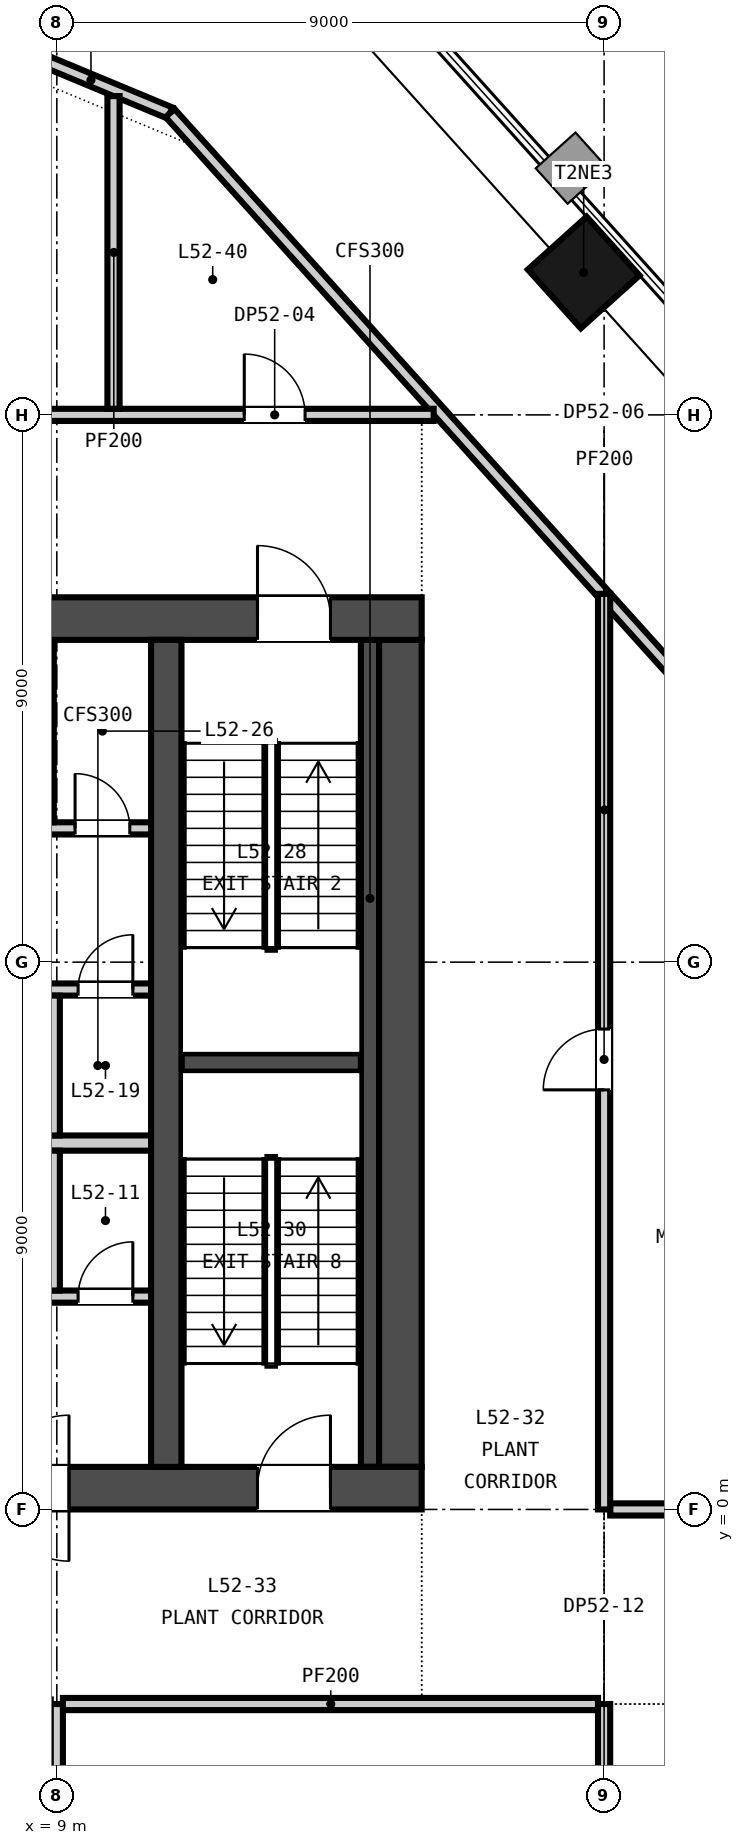
"""IFC4 building model, lengths in metres.
Left out: names, types, materials, properties, quantities, classifications, styles, units other than length and angle.
Written with IfcOpenShell. Run it as: python <this file> out.ifc"""

import sys

from ifc_helpers import new_model, si_unit, direction, frame, frame_2d, origin, origin_2d, place, context, subcontext, project, spatial, rectangle, extrude, element, fill, save


model = new_model("IFC4")
c1 = context("Model", 3, precision=1e-05, world=origin(), true_north=direction((0.0, 1.0)))
c2 = subcontext(c1, "Body", "Model", "MODEL_VIEW")
j1 = project(units=[si_unit("LENGTHUNIT", "METRE"), si_unit("PLANEANGLEUNIT", "RADIAN")], contexts=[c1])
p1 = place(None, origin())
s1 = spatial("IfcSite", under=j1, at=p1, CompositionType="ELEMENT")
p2 = place(p1, origin())
s2 = spatial("IfcBuilding", under=s1, at=p2, CompositionType="ELEMENT")
p3 = place(p2, frame((0.0, 0.0, 207.3)))
s3 = spatial("IfcBuildingStorey", under=s2, at=p3, CompositionType="ELEMENT", Elevation=207.3)
p4 = place(p3, frame((-15.0, 0.35, -0.3), z_axis=(0.0, 0.0, 1.0), x_axis=(1.0, 0.0, 0.0)))
e1 = element("IfcWall", 1, at=p4, inside=s3, PredefinedType="SOLIDWALL", context=c2, shape_type="SweptSolid", body=[
    extrude(rectangle(XDim=30.0, YDim=0.7, at=frame_2d((15.0, 0.0))), origin(), (0.0, 0.0, 1.0), 4.5),
])
p5 = place(p4, frame((5.8, 0.0, 0.3)))
e2 = element("IfcOpeningElement", 2, at=p5, cuts=e1, PredefinedType="OPENING", context=c2, shape_type="SweptSolid", body=[
    extrude(rectangle(XDim=2.4, YDim=2.4, at=frame_2d((1.2, 1.2))), frame((0.0, 0.36, 0.0), z_axis=(0.0, -1.0, 0.0), x_axis=(1.0, 0.0, 0.0)), (0.0, 0.0, 1.0), 0.72),
])
p6 = place(p4, frame((13.8, 0.0, 0.3)))
e3 = element("IfcOpeningElement", 3, at=p6, cuts=e1, PredefinedType="OPENING", context=c2, shape_type="SweptSolid", body=[
    extrude(rectangle(XDim=2.4, YDim=2.4, at=frame_2d((1.2, 1.2))), frame((0.0, 0.36, 0.0), z_axis=(0.0, -1.0, 0.0), x_axis=(1.0, 0.0, 0.0)), (0.0, 0.0, 1.0), 0.72),
])
p7 = place(p4, frame((21.8, 0.0, 0.3)))
e4 = element("IfcOpeningElement", 4, at=p7, cuts=e1, PredefinedType="OPENING", context=c2, shape_type="SweptSolid", body=[
    extrude(rectangle(XDim=2.4, YDim=2.4, at=frame_2d((1.2, 1.2))), frame((0.0, 0.36, 0.0), z_axis=(0.0, -1.0, 0.0), x_axis=(1.0, 0.0, 0.0)), (0.0, 0.0, 1.0), 0.72),
])
p8 = place(p4, frame((1.5, 0.0, 0.3)))
e5 = element("IfcOpeningElement", 5, at=p8, cuts=e1, PredefinedType="OPENING", context=c2, shape_type="SweptSolid", body=[
    extrude(rectangle(XDim=1.2, YDim=2.1, at=frame_2d((0.6, 1.05))), frame((0.0, 0.36, 0.0), z_axis=(0.0, -1.0, 0.0), x_axis=(1.0, 0.0, 0.0)), (0.0, 0.0, 1.0), 0.72),
])
p9 = place(p4, frame((27.3, 0.0, 0.3)))
e6 = element("IfcOpeningElement", 6, at=p9, cuts=e1, PredefinedType="OPENING", context=c2, shape_type="SweptSolid", body=[
    extrude(rectangle(XDim=1.2, YDim=2.1, at=frame_2d((0.6, 1.05))), frame((0.0, 0.36, 0.0), z_axis=(0.0, -1.0, 0.0), x_axis=(1.0, 0.0, 0.0)), (0.0, 0.0, 1.0), 0.72),
])
p10 = place(p3, frame((-15.0, 14.65, -0.3), z_axis=(0.0, 0.0, 1.0), x_axis=(1.0, 0.0, 0.0)))
e7 = element("IfcWall", 7, at=p10, inside=s3, PredefinedType="SOLIDWALL", context=c2, shape_type="SweptSolid", body=[
    extrude(rectangle(XDim=30.0, YDim=0.7, at=frame_2d((15.0, 0.0))), origin(), (0.0, 0.0, 1.0), 4.5),
])
p11 = place(p10, frame((9.25, 0.0, 0.3)))
e8 = element("IfcOpeningElement", 8, at=p11, cuts=e7, PredefinedType="OPENING", context=c2, shape_type="SweptSolid", body=[
    extrude(rectangle(XDim=1.5, YDim=2.1, at=frame_2d((0.75, 1.05))), frame((0.0, 0.36, 0.0), z_axis=(0.0, -1.0, 0.0), x_axis=(1.0, 0.0, 0.0)), (0.0, 0.0, 1.0), 0.72),
])
p12 = place(p10, frame((19.4, 0.0, 0.3)))
e9 = element("IfcOpeningElement", 9, at=p12, cuts=e7, PredefinedType="OPENING", context=c2, shape_type="SweptSolid", body=[
    extrude(rectangle(XDim=1.5, YDim=2.1, at=frame_2d((0.75, 1.05))), frame((0.0, 0.36, 0.0), z_axis=(0.0, -1.0, 0.0), x_axis=(1.0, 0.0, 0.0)), (0.0, 0.0, 1.0), 0.72),
])
p13 = place(p10, frame((1.5, 0.0, 0.3)))
e10 = element("IfcOpeningElement", 10, at=p13, cuts=e7, PredefinedType="OPENING", context=c2, shape_type="SweptSolid", body=[
    extrude(rectangle(XDim=1.2, YDim=2.1, at=frame_2d((0.6, 1.05))), frame((0.0, 0.36, 0.0), z_axis=(0.0, -1.0, 0.0), x_axis=(1.0, 0.0, 0.0)), (0.0, 0.0, 1.0), 0.72),
])
p14 = place(p10, frame((27.3, 0.0, 0.3)))
e11 = element("IfcOpeningElement", 11, at=p14, cuts=e7, PredefinedType="OPENING", context=c2, shape_type="SweptSolid", body=[
    extrude(rectangle(XDim=1.2, YDim=2.1, at=frame_2d((0.6, 1.05))), frame((0.0, 0.36, 0.0), z_axis=(0.0, -1.0, 0.0), x_axis=(1.0, 0.0, 0.0)), (0.0, 0.0, 1.0), 0.72),
])
p15 = place(p3, frame((14.65, 0.7, -0.3), z_axis=(0.0, 0.0, 1.0), x_axis=(0.0, 1.0, 0.0)))
e12 = element("IfcWall", 12, at=p15, inside=s3, PredefinedType="SOLIDWALL", context=c2, shape_type="SweptSolid", body=[
    extrude(rectangle(XDim=13.6, YDim=0.7, at=frame_2d((6.8, 0.0))), origin(), (0.0, 0.0, 1.0), 4.5),
])
p16 = place(p3, frame((10.8, 0.7, -0.3), z_axis=(0.0, 0.0, 1.0), x_axis=(0.0, 1.0, 0.0)))
e13 = element("IfcWall", 13, at=p16, inside=s3, PredefinedType="SOLIDWALL", context=c2, shape_type="SweptSolid", body=[
    extrude(rectangle(XDim=13.6, YDim=0.5, at=frame_2d((6.8, 0.0))), origin(), (0.0, 0.0, 1.0), 4.5),
])
p17 = place(p3, frame((17.664, 20.342, -0.3), z_axis=(0.0, 0.0, 1.0), x_axis=(-0.669130606359, 0.743144825477, 0.0)))
e14 = element("IfcColumn", 14, at=p17, inside=s3, PredefinedType="COLUMN", context=c2, shape_type="SweptSolid", body=[
    extrude(rectangle(XDim=1.3, YDim=1.3, at=origin_2d()), origin(), (0.0, 0.0, 1.0), 4.5),
])
p18 = place(p3, frame((-10.55, 3.5, 0.0), z_axis=(0.0, 0.0, 1.0), x_axis=(1.0, 0.0, 0.0)))
e15 = element("IfcWall", 15, at=p18, inside=s3, PredefinedType="PARTITIONING", context=c2, shape_type="SweptSolid", body=[
    extrude(rectangle(XDim=21.1, YDim=0.2, at=frame_2d((10.55, 0.0))), origin(), (0.0, 0.0, 1.0), 4.2),
])
p19 = place(p18, frame((19.9, 0.0, 0.0)))
e16 = element("IfcOpeningElement", 16, at=p19, cuts=e15, PredefinedType="OPENING", context=c2, shape_type="SweptSolid", body=[
    extrude(rectangle(XDim=0.9, YDim=2.1, at=frame_2d((0.45, 1.05))), frame((0.0, 0.11, 0.0), z_axis=(0.0, -1.0, 0.0), x_axis=(1.0, 0.0, 0.0)), (0.0, 0.0, 1.0), 0.22),
])
p20 = place(p3, frame((-10.55, 6.025, 0.0), z_axis=(0.0, 0.0, 1.0), x_axis=(1.0, 0.0, 0.0)))
e17 = element("IfcWall", 17, at=p20, inside=s3, PredefinedType="PARTITIONING", context=c2, shape_type="SweptSolid", body=[
    extrude(rectangle(XDim=21.1, YDim=0.25, at=frame_2d((10.55, 0.0))), origin(), (0.0, 0.0, 1.0), 4.2),
])
p21 = place(p3, frame((-10.55, 8.55, 0.0), z_axis=(0.0, 0.0, 1.0), x_axis=(1.0, 0.0, 0.0)))
e18 = element("IfcWall", 18, at=p21, inside=s3, PredefinedType="PARTITIONING", context=c2, shape_type="SweptSolid", body=[
    extrude(rectangle(XDim=21.1, YDim=0.2, at=frame_2d((10.55, 0.0))), origin(), (0.0, 0.0, 1.0), 4.2),
])
p22 = place(p21, frame((19.9, 0.0, 0.0)))
e19 = element("IfcOpeningElement", 19, at=p22, cuts=e18, PredefinedType="OPENING", context=c2, shape_type="SweptSolid", body=[
    extrude(rectangle(XDim=0.9, YDim=2.1, at=frame_2d((0.45, 1.05))), frame((0.0, 0.11, 0.0), z_axis=(0.0, -1.0, 0.0), x_axis=(1.0, 0.0, 0.0)), (0.0, 0.0, 1.0), 0.22),
])
p23 = place(p3, frame((5.9, 11.2, 0.0), z_axis=(0.0, 0.0, 1.0), x_axis=(1.0, 0.0, 0.0)))
e20 = element("IfcWall", 20, at=p23, inside=s3, PredefinedType="PARTITIONING", context=c2, shape_type="SweptSolid", body=[
    extrude(rectangle(XDim=4.65, YDim=0.2, at=frame_2d((2.325, 0.0))), origin(), (0.0, 0.0, 1.0), 4.2),
])
p24 = place(p23, frame((3.4, 0.0, 0.0)))
e21 = element("IfcOpeningElement", 21, at=p24, cuts=e20, PredefinedType="OPENING", context=c2, shape_type="SweptSolid", body=[
    extrude(rectangle(XDim=0.9, YDim=2.1, at=frame_2d((0.45, 1.05))), frame((0.0, 0.11, 0.0), z_axis=(0.0, -1.0, 0.0), x_axis=(1.0, 0.0, 0.0)), (0.0, 0.0, 1.0), 0.22),
])
p25 = place(p3, frame((8.925, 3.6, 0.0), z_axis=(0.0, 0.0, 1.0), x_axis=(0.0, 1.0, 0.0)))
e22 = element("IfcWall", 22, at=p25, inside=s3, PredefinedType="PARTITIONING", context=c2, shape_type="SweptSolid", body=[
    extrude(rectangle(XDim=2.3, YDim=0.25, at=frame_2d((1.15, 0.0))), origin(), (0.0, 0.0, 1.0), 4.2),
])
p26 = place(p3, frame((8.925, 6.15, 0.0), z_axis=(0.0, 0.0, 1.0), x_axis=(0.0, 1.0, 0.0)))
e23 = element("IfcWall", 23, at=p26, inside=s3, PredefinedType="PARTITIONING", context=c2, shape_type="SweptSolid", body=[
    extrude(rectangle(XDim=2.3, YDim=0.25, at=frame_2d((1.15, 0.0))), origin(), (0.0, 0.0, 1.0), 4.2),
])
p27 = place(p3, frame((8.825, 11.3, 0.0), z_axis=(0.0, 0.0, 1.0), x_axis=(0.0, 1.0, 0.0)))
e24 = element("IfcWall", 24, at=p27, inside=s3, PredefinedType="PARTITIONING", context=c2, shape_type="SweptSolid", body=[
    extrude(rectangle(XDim=3.0, YDim=0.25, at=frame_2d((1.5, 0.0))), origin(), (0.0, 0.0, 1.0), 4.2),
])
p28 = place(p3, frame((11.05, 7.35, 0.0), z_axis=(0.0, 0.0, 1.0), x_axis=(1.0, 0.0, 0.0)))
e25 = element("IfcWall", 25, at=p28, inside=s3, PredefinedType="SOLIDWALL", context=c2, shape_type="SweptSolid", body=[
    extrude(rectangle(XDim=2.95, YDim=0.3, at=frame_2d((1.475, 0.0))), origin(), (0.0, 0.0, 1.0), 4.2),
])
p29 = place(p3, frame((14.15, 0.7, 0.0), z_axis=(0.0, 0.0, 1.0), x_axis=(0.0, 1.0, 0.0)))
e26 = element("IfcWall", 26, at=p29, inside=s3, PredefinedType="SOLIDWALL", context=c2, shape_type="SweptSolid", body=[
    extrude(rectangle(XDim=13.6, YDim=0.3, at=frame_2d((6.8, 0.0))), origin(), (0.0, 0.0, 1.0), 4.2),
])
p30 = place(p3, frame((9.1, -3.2, 0.0), z_axis=(0.0, 0.0, 1.0), x_axis=(1.0, 0.0, 0.0)))
e27 = element("IfcWall", 27, at=p30, inside=s3, PredefinedType="PARTITIONING", context=c2, shape_type="SweptSolid", body=[
    extrude(rectangle(XDim=8.8, YDim=0.2, at=frame_2d((4.4, 0.0))), origin(), (0.0, 0.0, 1.0), 4.2),
])
p31 = place(p3, frame((18.1, 0.0, 0.0), z_axis=(0.0, 0.0, 1.0), x_axis=(1.0, 0.0, 0.0)))
e28 = element("IfcWall", 28, at=p31, inside=s3, PredefinedType="PARTITIONING", context=c2, shape_type="SweptSolid", body=[
    extrude(rectangle(XDim=9.725, YDim=0.2, at=frame_2d((4.863, 0.0))), origin(), (0.0, 0.0, 1.0), 4.2),
])
p32 = place(p3, frame((-17.925, 18.0, 0.0), z_axis=(0.0, 0.0, 1.0), x_axis=(1.0, 0.0, 0.0)))
e29 = element("IfcWall", 29, at=p32, inside=s3, PredefinedType="PARTITIONING", context=c2, shape_type="SweptSolid", body=[
    extrude(rectangle(XDim=33.122, YDim=0.2, at=frame_2d((16.561, 0.0))), origin(), (0.0, 0.0, 1.0), 4.2),
])
p33 = place(p32, frame((0.9, 0.0, 0.0)))
e30 = element("IfcOpeningElement", 30, at=p33, cuts=e29, PredefinedType="OPENING", context=c2, shape_type="SweptSolid", body=[
    extrude(rectangle(XDim=1.0, YDim=2.1, at=frame_2d((0.5, 1.05))), frame((0.0, 0.11, 0.0), z_axis=(0.0, -1.0, 0.0), x_axis=(1.0, 0.0, 0.0)), (0.0, 0.0, 1.0), 0.22),
])
p34 = place(p32, frame((11.109, 0.0, 0.0)))
e31 = element("IfcOpeningElement", 31, at=p34, cuts=e29, PredefinedType="OPENING", context=c2, shape_type="SweptSolid", body=[
    extrude(rectangle(XDim=1.0, YDim=2.1, at=frame_2d((0.5, 1.05))), frame((0.0, 0.11, 0.0), z_axis=(0.0, -1.0, 0.0), x_axis=(1.0, 0.0, 0.0)), (0.0, 0.0, 1.0), 0.22),
])
p35 = place(p32, frame((22.859, 0.0, 0.0)))
e32 = element("IfcOpeningElement", 32, at=p35, cuts=e29, PredefinedType="OPENING", context=c2, shape_type="SweptSolid", body=[
    extrude(rectangle(XDim=1.0, YDim=2.1, at=frame_2d((0.5, 1.05))), frame((0.0, 0.11, 0.0), z_axis=(0.0, -1.0, 0.0), x_axis=(1.0, 0.0, 0.0)), (0.0, 0.0, 1.0), 0.22),
])
p36 = place(p32, frame((30.008, 0.0, 0.0)))
e33 = element("IfcOpeningElement", 33, at=p36, cuts=e29, PredefinedType="OPENING", context=c2, shape_type="SweptSolid", body=[
    extrude(rectangle(XDim=1.0, YDim=2.1, at=frame_2d((0.5, 1.05))), frame((0.0, 0.11, 0.0), z_axis=(0.0, -1.0, 0.0), x_axis=(1.0, 0.0, 0.0)), (0.0, 0.0, 1.0), 0.22),
])
p37 = place(p3, frame((9.0, -9.0, 0.0), z_axis=(0.0, 0.0, 1.0), x_axis=(0.0, 1.0, 0.0)))
e34 = element("IfcWall", 34, at=p37, inside=s3, PredefinedType="PARTITIONING", context=c2, shape_type="SweptSolid", body=[
    extrude(rectangle(XDim=5.8, YDim=0.2, at=frame_2d((2.9, 0.0))), origin(), (0.0, 0.0, 1.0), 4.2),
])
p38 = place(p3, frame((9.932, 18.1, 0.0), z_axis=(0.0, 0.0, 1.0), x_axis=(0.0, 1.0, 0.0)))
e35 = element("IfcWall", 35, at=p38, inside=s3, PredefinedType="PARTITIONING", context=c2, shape_type="SweptSolid", body=[
    extrude(rectangle(XDim=5.142, YDim=0.2, at=frame_2d((2.571, 0.0))), origin(), (0.0, 0.0, 1.0), 4.2),
])
p39 = place(p3, frame((18.0, -15.5, 0.0), z_axis=(0.0, 0.0, 1.0), x_axis=(0.0, 1.0, 0.0)))
e36 = element("IfcWall", 36, at=p39, inside=s3, PredefinedType="PARTITIONING", context=c2, shape_type="SweptSolid", body=[
    extrude(rectangle(XDim=12.3, YDim=0.2, at=frame_2d((6.15, 0.0))), origin(), (0.0, 0.0, 1.0), 4.2),
])
p40 = place(p39, frame((5.65, 0.0, 0.0)))
e37 = element("IfcOpeningElement", 37, at=p40, cuts=e36, PredefinedType="OPENING", context=c2, shape_type="SweptSolid", body=[
    extrude(rectangle(XDim=1.0, YDim=2.1, at=frame_2d((0.5, 1.05))), frame((0.0, 0.11, 0.0), z_axis=(0.0, -1.0, 0.0), x_axis=(1.0, 0.0, 0.0)), (0.0, 0.0, 1.0), 0.22),
])
p41 = place(p3, frame((18.0, 0.0, 0.0), z_axis=(0.0, 0.0, 1.0), x_axis=(0.0, 1.0, 0.0)))
e38 = element("IfcWall", 38, at=p41, inside=s3, PredefinedType="PARTITIONING", context=c2, shape_type="SweptSolid", body=[
    extrude(rectangle(XDim=15.057, YDim=0.2, at=frame_2d((7.529, 0.0))), origin(), (0.0, 0.0, 1.0), 4.2),
])
p42 = place(p41, frame((6.9, 0.0, 0.0)))
e39 = element("IfcOpeningElement", 39, at=p42, cuts=e38, PredefinedType="OPENING", context=c2, shape_type="SweptSolid", body=[
    extrude(rectangle(XDim=1.0, YDim=2.1, at=frame_2d((0.5, 1.05))), frame((0.0, 0.11, 0.0), z_axis=(0.0, -1.0, 0.0), x_axis=(1.0, 0.0, 0.0)), (0.0, 0.0, 1.0), 0.22),
])
p43 = place(p3, frame((8.25, 24.05, 0.0), z_axis=(0.0, 0.0, 1.0), x_axis=(0.923344746626, -0.383971976683, 0.0)))
e40 = element("IfcWall", 40, at=p43, inside=s3, PredefinedType="PARTITIONING", context=c2, shape_type="SweptSolid", body=[
    extrude(rectangle(XDim=2.829, YDim=0.2, at=frame_2d((1.415, 0.0))), origin(), (0.0, 0.0, 1.0), 4.2),
])
p44 = place(p3, frame((10.863, 22.964, 0.0), z_axis=(0.0, 0.0, 1.0), x_axis=(0.669131375447, -0.743144132987, 0.0)))
e41 = element("IfcWall", 41, at=p44, inside=s3, PredefinedType="PARTITIONING", context=c2, shape_type="SweptSolid", body=[
    extrude(rectangle(XDim=27.355, YDim=0.2, at=frame_2d((13.678, 0.0))), origin(), (0.0, 0.0, 1.0), 4.2),
])
p45 = place(p3, frame((29.184, 2.448, 0.0), z_axis=(0.0, 0.0, 1.0), x_axis=(-0.499996482004, -0.866027434891, 0.0)))
e42 = element("IfcWall", 42, at=p45, inside=s3, PredefinedType="PARTITIONING", context=c2, shape_type="SweptSolid", body=[
    extrude(rectangle(XDim=24.962, YDim=0.2, at=frame_2d((12.481, 0.0))), origin(), (0.0, 0.0, 1.0), 4.2),
])
p46 = place(p19, origin())
e43 = element("IfcDoor", 43, at=p46, inside=s3, OperationType="SINGLE_SWING_RIGHT", PredefinedType="DOOR", context=c2, shape_type="SweptSolid", body=[
    extrude(rectangle(XDim=0.9, YDim=2.1, at=frame_2d((0.45, 1.05))), frame((0.0, 0.025, 0.0), z_axis=(0.0, -1.0, 0.0), x_axis=(1.0, 0.0, 0.0)), (0.0, 0.0, 1.0), 0.05),
])
fill(e16, e43)
p47 = place(p22, origin())
e44 = element("IfcDoor", 44, at=p47, inside=s3, OperationType="SINGLE_SWING_RIGHT", PredefinedType="DOOR", context=c2, shape_type="SweptSolid", body=[
    extrude(rectangle(XDim=0.9, YDim=2.1, at=frame_2d((0.45, 1.05))), frame((0.0, 0.025, 0.0), z_axis=(0.0, -1.0, 0.0), x_axis=(1.0, 0.0, 0.0)), (0.0, 0.0, 1.0), 0.05),
])
fill(e19, e44)
p48 = place(p24, origin())
e45 = element("IfcDoor", 45, at=p48, inside=s3, OperationType="SINGLE_SWING_LEFT", PredefinedType="DOOR", context=c2, shape_type="SweptSolid", body=[
    extrude(rectangle(XDim=0.9, YDim=2.1, at=frame_2d((0.45, 1.05))), frame((0.0, 0.025, 0.0), z_axis=(0.0, -1.0, 0.0), x_axis=(1.0, 0.0, 0.0)), (0.0, 0.0, 1.0), 0.05),
])
fill(e21, e45)
p49 = place(p7, origin())
e46 = element("IfcDoor", 46, at=p49, inside=s3, OperationType="DOUBLE_DOOR_DOUBLE_SWING", PredefinedType="DOOR", context=c2, shape_type="SweptSolid", body=[
    extrude(rectangle(XDim=2.4, YDim=2.4, at=frame_2d((1.2, 1.2))), frame((0.0, 0.025, 0.0), z_axis=(0.0, -1.0, 0.0), x_axis=(1.0, 0.0, 0.0)), (0.0, 0.0, 1.0), 0.05),
])
fill(e4, e46)
p50 = place(p14, origin())
e47 = element("IfcDoor", 47, at=p50, inside=s3, OperationType="SINGLE_SWING_LEFT", PredefinedType="DOOR", context=c2, shape_type="SweptSolid", body=[
    extrude(rectangle(XDim=1.2, YDim=2.1, at=frame_2d((0.6, 1.05))), frame((0.0, 0.025, 0.0), z_axis=(0.0, -1.0, 0.0), x_axis=(1.0, 0.0, 0.0)), (0.0, 0.0, 1.0), 0.05),
])
fill(e11, e47)
p51 = place(p9, origin())
e48 = element("IfcDoor", 48, at=p51, inside=s3, OperationType="SINGLE_SWING_RIGHT", PredefinedType="DOOR", context=c2, shape_type="SweptSolid", body=[
    extrude(rectangle(XDim=1.2, YDim=2.1, at=frame_2d((0.6, 1.05))), frame((0.0, 0.025, 0.0), z_axis=(0.0, -1.0, 0.0), x_axis=(1.0, 0.0, 0.0)), (0.0, 0.0, 1.0), 0.05),
])
fill(e6, e48)
p52 = place(p36, origin())
e49 = element("IfcDoor", 49, at=p52, inside=s3, OperationType="SINGLE_SWING_LEFT", PredefinedType="DOOR", context=c2, shape_type="SweptSolid", body=[
    extrude(rectangle(XDim=1.0, YDim=2.1, at=frame_2d((0.5, 1.05))), frame((0.0, 0.025, 0.0), z_axis=(0.0, -1.0, 0.0), x_axis=(1.0, 0.0, 0.0)), (0.0, 0.0, 1.0), 0.05),
])
fill(e33, e49)
p53 = place(p42, origin())
e50 = element("IfcDoor", 50, at=p53, inside=s3, OperationType="SINGLE_SWING_LEFT", PredefinedType="DOOR", context=c2, shape_type="SweptSolid", body=[
    extrude(rectangle(XDim=1.0, YDim=2.1, at=frame_2d((0.5, 1.05))), frame((0.0, 0.025, 0.0), z_axis=(0.0, -1.0, 0.0), x_axis=(1.0, 0.0, 0.0)), (0.0, 0.0, 1.0), 0.05),
])
fill(e39, e50)
save(model, sys.argv[1])
